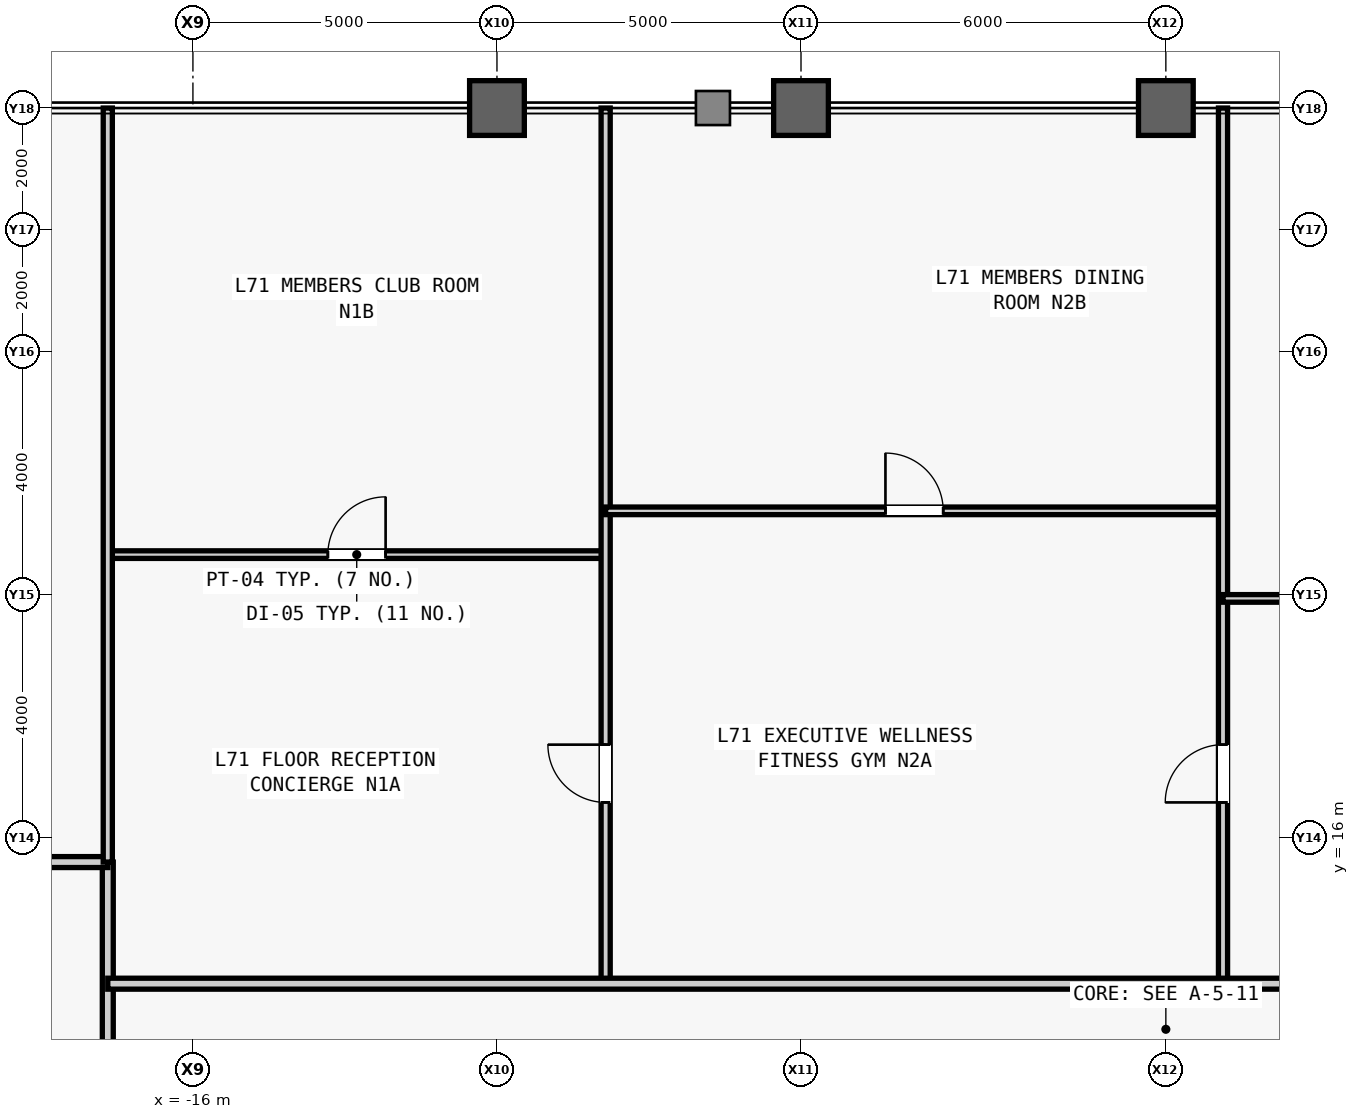
"""IFC4 building model, lengths in metres.
Left out: names, types, materials, properties, quantities, classifications, styles, units other than length and angle.
Written with IfcOpenShell. Run it as: python <this file> out.ifc"""

import sys

from ifc_helpers import new_model, si_unit, direction, frame, frame_2d, origin, origin_2d, place, context, subcontext, project, spatial, rectangle, hollow_rectangle, extrude, source, transform, mapped, element, fill, save


model = new_model("IFC4")
c1 = context("Model", 3, precision=1e-05, world=origin(), true_north=direction((0.0, 1.0)))
c2 = subcontext(c1, "Body", "Model", "MODEL_VIEW")
j1 = project(units=[si_unit("LENGTHUNIT", "METRE"), si_unit("PLANEANGLEUNIT", "RADIAN")], contexts=[c1])
p1 = place(None, origin())
s1 = spatial("IfcSite", under=j1, at=p1, CompositionType="ELEMENT")
p2 = place(p1, origin())
s2 = spatial("IfcBuilding", under=s1, at=p2, CompositionType="ELEMENT")
p3 = place(p2, frame((0.0, 0.0, 301.5)))
s3 = spatial("IfcBuildingStorey", under=s2, at=p3, CompositionType="ELEMENT", Elevation=301.5)
m1 = source(origin(), c2, "Body", "SweptSolid", [
    extrude(hollow_rectangle(XDim=0.9, YDim=0.9, WallThickness=0.05, at=origin_2d()), origin(), (0.0, 0.0, 1.0), 4.0),
])
for number, where, z_axis, x_axis in (
    (1, (-11.0, 28.0, 0.0), (0.0, 0.0, 1.0), (1.0, 0.0, 0.0)),
    (2, (-6.0, 28.0, 0.0), (0.0, 0.0, 1.0), (1.0, 0.0, 0.0)),
    (3, (0.0, 28.0, 0.0), (0.0, 0.0, 1.0), (1.0, 0.0, 0.0)),
):
    element("IfcColumn", number, at=place(p3, frame(where, z_axis=z_axis, x_axis=x_axis)), inside=s3, PredefinedType="COLUMN", context=c2, shape_type="MappedRepresentation", body=[
        mapped(m1, transform((0.0, 0.0, 0.0), scale=1.0)),
    ])
m2 = source(origin(), c2, "Body", "SweptSolid", [
    extrude(rectangle(XDim=8.4, YDim=0.18, at=frame_2d((4.2, 0.0))), origin(), (0.0, 0.0, 1.0), 3.78),
])
p4 = place(p3, frame((-17.4, 7.2, 0.0), z_axis=(0.0, 0.0, 1.0), x_axis=(0.0, 1.0, 0.0)))
e4 = element("IfcWall", 4, at=p4, inside=s3, PredefinedType="PARTITIONING", context=c2, shape_type="MappedRepresentation", body=[
    mapped(m2, transform((0.0, 0.0, 0.0), scale=1.0)),
])
m3 = source(origin(), c2, "Body", "SweptSolid", [
    extrude(rectangle(XDim=2.4, YDim=0.18, at=frame_2d((1.2, 0.0))), origin(), (0.0, 0.0, 1.0), 3.78),
])
p5 = place(p3, frame((-19.8, 15.6, 0.0), z_axis=(0.0, 0.0, 1.0), x_axis=(1.0, 0.0, 0.0)))
e5 = element("IfcWall", 5, at=p5, inside=s3, PredefinedType="PARTITIONING", context=c2, shape_type="MappedRepresentation", body=[
    mapped(m3, transform((0.0, 0.0, 0.0), scale=1.0)),
])
m4 = source(origin(), c2, "Body", "SweptSolid", [
    extrude(rectangle(XDim=8.188, YDim=0.125, at=frame_2d((4.094, 0.0))), origin(), (0.0, 0.0, 1.0), 3.78),
])
p6 = place(p3, frame((-17.4, 20.656, 0.0), z_axis=(0.0, 0.0, 1.0), x_axis=(1.0, 0.0, 0.0)))
e6 = element("IfcWall", 6, at=p6, inside=s3, PredefinedType="PARTITIONING", context=c2, shape_type="MappedRepresentation", body=[
    mapped(m4, transform((0.0, 0.0, 0.0), scale=1.0)),
])
m5 = source(origin(), c2, "Body", "SweptSolid", [
    extrude(rectangle(XDim=0.95, YDim=2.15, at=frame_2d((0.475, 1.075))), frame((0.0, 0.073, 0.0), z_axis=(0.0, -1.0, 0.0), x_axis=(1.0, 0.0, 0.0)), (0.0, 0.0, 1.0), 0.145),
])
p7 = place(p6, frame((3.619, 0.0, 0.0)))
e7 = element("IfcOpeningElement", 7, at=p7, cuts=e6, PredefinedType="OPENING", context=c2, shape_type="MappedRepresentation", body=[
    mapped(m5, transform((0.0, 0.0, 0.0), scale=1.0)),
])
m6 = source(origin(), c2, "Body", "SweptSolid", [
    extrude(rectangle(XDim=14.4, YDim=0.15, at=frame_2d((7.2, 0.0))), origin(), (0.0, 0.0, 1.0), 3.78),
])
p8 = place(p3, frame((-9.212, 13.6, 0.0), z_axis=(0.0, 0.0, 1.0), x_axis=(0.0, 1.0, 0.0)))
e8 = element("IfcWall", 8, at=p8, inside=s3, PredefinedType="PARTITIONING", context=c2, shape_type="MappedRepresentation", body=[
    mapped(m6, transform((0.0, 0.0, 0.0), scale=1.0)),
])
m7 = source(origin(), c2, "Body", "SweptSolid", [
    extrude(rectangle(XDim=0.95, YDim=2.15, at=frame_2d((0.475, 1.075))), frame((0.0, 0.085, 0.0), z_axis=(0.0, -1.0, 0.0), x_axis=(1.0, 0.0, 0.0)), (0.0, 0.0, 1.0), 0.17),
])
p9 = place(p8, frame((2.981, 0.0, 0.0)))
e9 = element("IfcOpeningElement", 9, at=p9, cuts=e8, PredefinedType="OPENING", context=c2, shape_type="MappedRepresentation", body=[
    mapped(m7, transform((0.0, 0.0, 0.0), scale=1.0)),
])
m8 = source(origin(), c2, "Body", "SweptSolid", [
    extrude(rectangle(XDim=10.152, YDim=0.125, at=frame_2d((5.076, 0.0))), origin(), (0.0, 0.0, 1.0), 3.78),
])
p10 = place(p3, frame((-9.212, 21.376, 0.0), z_axis=(0.0, 0.0, 1.0), x_axis=(1.0, 0.0, 0.0)))
e10 = element("IfcWall", 10, at=p10, inside=s3, PredefinedType="PARTITIONING", context=c2, shape_type="MappedRepresentation", body=[
    mapped(m8, transform((0.0, 0.0, 0.0), scale=1.0)),
])
p11 = place(p10, frame((4.601, 0.0, 0.0)))
e11 = element("IfcOpeningElement", 11, at=p11, cuts=e10, PredefinedType="OPENING", context=c2, shape_type="MappedRepresentation", body=[
    mapped(m5, transform((0.0, 0.0, 0.0), scale=1.0)),
])
p12 = place(p3, frame((0.94, 13.6, 0.0), z_axis=(0.0, 0.0, 1.0), x_axis=(0.0, 1.0, 0.0)))
e12 = element("IfcWall", 12, at=p12, inside=s3, PredefinedType="PARTITIONING", context=c2, shape_type="MappedRepresentation", body=[
    mapped(m6, transform((0.0, 0.0, 0.0), scale=1.0)),
])
p13 = place(p12, frame((2.981, 0.0, 0.0)))
e13 = element("IfcOpeningElement", 13, at=p13, cuts=e12, PredefinedType="OPENING", context=c2, shape_type="MappedRepresentation", body=[
    mapped(m7, transform((0.0, 0.0, 0.0), scale=1.0)),
])
m9 = source(origin(), c2, "Body", "SweptSolid", [
    extrude(rectangle(XDim=8.515, YDim=0.125, at=frame_2d((4.258, 0.0))), origin(), (0.0, 0.0, 1.0), 3.78),
])
p14 = place(p3, frame((0.94, 19.936, 0.0), z_axis=(0.0, 0.0, 1.0), x_axis=(1.0, 0.0, 0.0)))
e14 = element("IfcWall", 14, at=p14, inside=s3, PredefinedType="PARTITIONING", context=c2, shape_type="MappedRepresentation", body=[
    mapped(m9, transform((0.0, 0.0, 0.0), scale=1.0)),
])
p15 = place(p14, frame((3.782, 0.0, 0.0)))
e15 = element("IfcOpeningElement", 15, at=p15, cuts=e14, PredefinedType="OPENING", context=c2, shape_type="MappedRepresentation", body=[
    mapped(m5, transform((0.0, 0.0, 0.0), scale=1.0)),
])
m10 = source(origin(), c2, "Body", "SweptSolid", [
    extrude(rectangle(XDim=32.75, YDim=0.18, at=frame_2d((16.375, 0.0))), origin(), (0.0, 0.0, 1.0), 3.78),
])
p16 = place(p3, frame((-17.4, 13.6, 0.0), z_axis=(0.0, 0.0, 1.0), x_axis=(1.0, 0.0, 0.0)))
e16 = element("IfcWall", 16, at=p16, inside=s3, PredefinedType="PARTITIONING", context=c2, shape_type="MappedRepresentation", body=[
    mapped(m10, transform((0.0, 0.0, 0.0), scale=1.0)),
])
m11 = source(origin(), c2, "Body", "SweptSolid", [
    extrude(rectangle(XDim=1.05, YDim=2.2, at=frame_2d((0.525, 1.1))), frame((0.0, 0.1, 0.0), z_axis=(0.0, -1.0, 0.0), x_axis=(1.0, 0.0, 0.0)), (0.0, 0.0, 1.0), 0.2),
])
p17 = place(p16, frame((24.603, 0.0, 0.0)))
e17 = element("IfcOpeningElement", 17, at=p17, cuts=e16, PredefinedType="OPENING", context=c2, shape_type="MappedRepresentation", body=[
    mapped(m11, transform((0.0, 0.0, 0.0), scale=1.0)),
])
p18 = place(p16, frame((28.802, 0.0, 0.0)))
e18 = element("IfcOpeningElement", 18, at=p18, cuts=e16, PredefinedType="OPENING", context=c2, shape_type="MappedRepresentation", body=[
    mapped(m11, transform((0.0, 0.0, 0.0), scale=1.0)),
])
m12 = source(origin(), c2, "Body", "SweptSolid", [
    extrude(rectangle(XDim=12.4, YDim=0.15, at=frame_2d((6.2, 0.0))), origin(), (0.0, 0.0, 1.0), 3.78),
])
p19 = place(p3, frame((-17.4, 15.6, 0.0), z_axis=(0.0, 0.0, 1.0), x_axis=(0.0, 1.0, 0.0)))
e19 = element("IfcWall", 19, at=p19, inside=s3, PredefinedType="PARTITIONING", context=c2, shape_type="MappedRepresentation", body=[
    mapped(m12, transform((0.0, 0.0, 0.0), scale=1.0)),
])
m13 = source(origin(), c2, "Body", "SweptSolid", [
    extrude(rectangle(XDim=0.95, YDim=2.15, at=frame_2d((0.475, 1.075))), frame((0.0, 0.025, 0.0), z_axis=(0.0, -1.0, 0.0), x_axis=(1.0, 0.0, 0.0)), (0.0, 0.0, 1.0), 0.05),
])
p20 = place(p7, origin())
e20 = element("IfcDoor", 20, at=p20, inside=s3, OperationType="SINGLE_SWING_RIGHT", PredefinedType="DOOR", context=c2, shape_type="MappedRepresentation", body=[
    mapped(m13, transform((0.0, 0.0, 0.0), scale=1.0)),
])
fill(e7, e20)
p21 = place(p9, origin())
e21 = element("IfcDoor", 21, at=p21, inside=s3, OperationType="SINGLE_SWING_RIGHT", PredefinedType="DOOR", context=c2, shape_type="MappedRepresentation", body=[
    mapped(m13, transform((0.0, 0.0, 0.0), scale=1.0)),
])
fill(e9, e21)
p22 = place(p11, origin())
e22 = element("IfcDoor", 22, at=p22, inside=s3, OperationType="SINGLE_SWING_LEFT", PredefinedType="DOOR", context=c2, shape_type="MappedRepresentation", body=[
    mapped(m13, transform((0.0, 0.0, 0.0), scale=1.0)),
])
fill(e11, e22)
p23 = place(p13, origin())
e23 = element("IfcDoor", 23, at=p23, inside=s3, OperationType="SINGLE_SWING_LEFT", PredefinedType="DOOR", context=c2, shape_type="MappedRepresentation", body=[
    mapped(m13, transform((0.0, 0.0, 0.0), scale=1.0)),
])
fill(e13, e23)
save(model, sys.argv[1])
